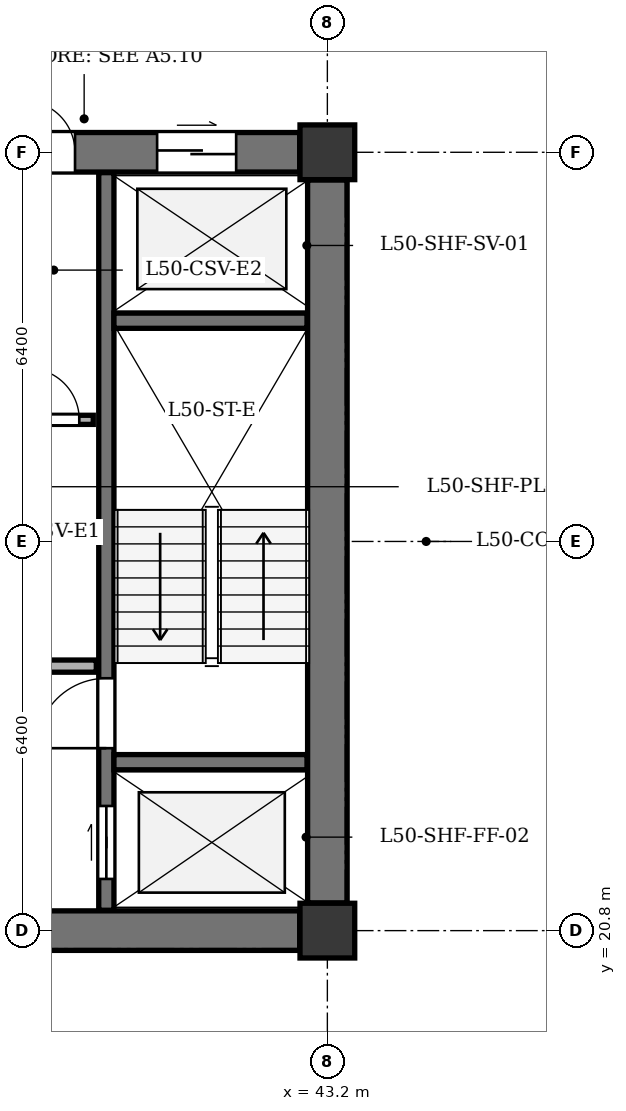
"""IFC4 building model, lengths in metres.
Left out: names, types, materials, properties, quantities, classifications, styles, units other than length and angle.
Written with IfcOpenShell. Run it as: python <this file> out.ifc"""

import sys

from ifc_helpers import new_model, si_unit, direction, frame, frame_2d, origin, origin_2d, place, context, subcontext, project, spatial, rectangle, extrude, element, fill, save


model = new_model("IFC4")
c1 = context("Model", 3, precision=1e-05, world=origin(), true_north=direction((0.0, 1.0)))
c2 = subcontext(c1, "Body", "Model", "MODEL_VIEW")
j1 = project(units=[si_unit("LENGTHUNIT", "METRE"), si_unit("PLANEANGLEUNIT", "RADIAN")], contexts=[c1])
p1 = place(None, origin())
s1 = spatial("IfcSite", under=j1, at=p1, CompositionType="ELEMENT")
p2 = place(p1, origin())
s2 = spatial("IfcBuilding", under=s1, at=p2, CompositionType="ELEMENT")
p3 = place(p2, frame((0.0, 0.0, 193.8)))
s3 = spatial("IfcBuildingStorey", under=s2, at=p3, CompositionType="ELEMENT", Elevation=193.8)
for number, where, z_axis, x_axis in (
    (1, (43.2, 20.8, 0.0), (0.0, 0.0, 1.0), (1.0, 0.0, 0.0)),
    (2, (43.2, 33.6, 0.0), (0.0, 0.0, 1.0), (1.0, 0.0, 0.0)),
):
    element("IfcColumn", number, at=place(p3, frame(where, z_axis=z_axis, x_axis=x_axis)), inside=s3, PredefinedType="COLUMN", context=c2, shape_type="SweptSolid", body=[
        extrude(rectangle(XDim=0.9, YDim=0.9, at=origin_2d()), origin(), (0.0, 0.0, 1.0), 3.5),
    ])
p4 = place(p3, frame((43.2, 21.255, 0.0), z_axis=(0.0, 0.0, 1.0), x_axis=(0.0, 1.0, 0.0)))
e3 = element("IfcWall", 3, at=p4, inside=s3, PredefinedType="SHEAR", context=c2, shape_type="SweptSolid", body=[
    extrude(rectangle(XDim=11.89, YDim=0.65, at=frame_2d((5.945, 0.0))), origin(), (0.0, 0.0, 1.0), 3.05),
])
p5 = place(p3, frame((35.655, 20.8, 0.0), z_axis=(0.0, 0.0, 1.0), x_axis=(1.0, 0.0, 0.0)))
e4 = element("IfcWall", 4, at=p5, inside=s3, PredefinedType="SHEAR", context=c2, shape_type="SweptSolid", body=[
    extrude(rectangle(XDim=7.09, YDim=0.65, at=frame_2d((3.545, 0.0))), origin(), (0.0, 0.0, 1.0), 3.05),
])
p6 = place(p3, frame((35.655, 33.6, 0.0), z_axis=(0.0, 0.0, 1.0), x_axis=(1.0, 0.0, 0.0)))
e5 = element("IfcWall", 5, at=p6, inside=s3, PredefinedType="SHEAR", context=c2, shape_type="SweptSolid", body=[
    extrude(rectangle(XDim=7.09, YDim=0.65, at=frame_2d((3.545, 0.0))), origin(), (0.0, 0.0, 1.0), 3.05),
])
p7 = place(p6, frame((4.745, 0.0, 0.0)))
e6 = element("IfcOpeningElement", 6, at=p7, cuts=e5, PredefinedType="OPENING", context=c2, shape_type="SweptSolid", body=[
    extrude(rectangle(XDim=1.3, YDim=2.15, at=frame_2d((0.65, 1.075))), frame((0.0, 0.335, 0.0), z_axis=(0.0, -1.0, 0.0), x_axis=(1.0, 0.0, 0.0)), (0.0, 0.0, 1.0), 0.67),
])
p8 = place(p6, frame((2.545, 0.0, 0.0)))
e7 = element("IfcOpeningElement", 7, at=p8, cuts=e5, PredefinedType="OPENING", context=c2, shape_type="SweptSolid", body=[
    extrude(rectangle(XDim=0.85, YDim=2.02, at=frame_2d((0.425, 1.01))), frame((0.0, 0.335, 0.0), z_axis=(0.0, -1.0, 0.0), x_axis=(1.0, 0.0, 0.0)), (0.0, 0.0, 1.0), 0.67),
])
p9 = place(p3, frame((39.565, 21.135, 0.0), z_axis=(0.0, 0.0, 1.0), x_axis=(0.0, 1.0, 0.0)))
e8 = element("IfcWall", 8, at=p9, inside=s3, PredefinedType="SHEAR", context=c2, shape_type="SweptSolid", body=[
    extrude(rectangle(XDim=12.13, YDim=0.25, at=frame_2d((6.065, 0.0))), origin(), (0.0, 0.0, 1.0), 3.05),
])
p10 = place(p9, frame((0.515, 0.0, 0.0)))
e9 = element("IfcOpeningElement", 9, at=p10, cuts=e8, PredefinedType="OPENING", context=c2, shape_type="SweptSolid", body=[
    extrude(rectangle(XDim=1.2, YDim=2.15, at=frame_2d((0.6, 1.075))), frame((0.0, 0.135, 0.0), z_axis=(0.0, -1.0, 0.0), x_axis=(1.0, 0.0, 0.0)), (0.0, 0.0, 1.0), 0.27),
])
p11 = place(p9, frame((2.665, 0.0, 0.0)))
e10 = element("IfcOpeningElement", 10, at=p11, cuts=e8, PredefinedType="OPENING", context=c2, shape_type="SweptSolid", body=[
    extrude(rectangle(XDim=1.15, YDim=2.15, at=frame_2d((0.575, 1.075))), frame((0.0, 0.135, 0.0), z_axis=(0.0, -1.0, 0.0), x_axis=(1.0, 0.0, 0.0)), (0.0, 0.0, 1.0), 0.27),
])
for number, where, z_axis, x_axis in (
    (11, (39.69, 23.57, 0.0), (0.0, 0.0, 1.0), (1.0, 0.0, 0.0)),
    (12, (39.69, 30.83, 0.0), (0.0, 0.0, 1.0), (1.0, 0.0, 0.0)),
):
    element("IfcWall", number, at=place(p3, frame(where, z_axis=z_axis, x_axis=x_axis)), inside=s3, PredefinedType="SHEAR", context=c2, shape_type="SweptSolid", body=[
        extrude(rectangle(XDim=3.175, YDim=0.25, at=frame_2d((1.587, 0.0))), origin(), (0.0, 0.0, 1.0), 3.05),
    ])
p12 = place(p3, frame((35.535, 25.15, 0.0), z_axis=(0.0, 0.0, 1.0), x_axis=(1.0, 0.0, 0.0)))
e13 = element("IfcWall", 13, at=p12, inside=s3, PredefinedType="SOLIDWALL", context=c2, shape_type="SweptSolid", body=[
    extrude(rectangle(XDim=3.865, YDim=0.2, at=frame_2d((1.933, 0.0))), origin(), (0.0, 0.0, 1.0), 3.05),
])
p13 = place(p3, frame((38.05, 29.2, 0.0), z_axis=(0.0, 0.0, 1.0), x_axis=(1.0, 0.0, 0.0)))
e14 = element("IfcWall", 14, at=p13, inside=s3, PredefinedType="PARTITIONING", context=c2, shape_type="SweptSolid", body=[
    extrude(rectangle(XDim=1.3, YDim=0.15, at=frame_2d((0.65, 0.0))), origin(), (0.0, 0.0, 1.0), 3.05),
])
p14 = place(p13, frame((0.22, 0.0, 0.0)))
e15 = element("IfcOpeningElement", 15, at=p14, cuts=e14, PredefinedType="OPENING", context=c2, shape_type="SweptSolid", body=[
    extrude(rectangle(XDim=0.85, YDim=2.02, at=frame_2d((0.425, 1.01))), frame((0.0, 0.085, 0.0), z_axis=(0.0, -1.0, 0.0), x_axis=(1.0, 0.0, 0.0)), (0.0, 0.0, 1.0), 0.17),
])
p15 = place(p7, origin())
e16 = element("IfcDoor", 16, at=p15, inside=s3, OperationType="DOUBLE_DOOR_SLIDING", PredefinedType="DOOR", context=c2, shape_type="SweptSolid", body=[
    extrude(rectangle(XDim=1.3, YDim=2.15, at=frame_2d((0.65, 1.075))), frame((0.0, 0.025, 0.0), z_axis=(0.0, -1.0, 0.0), x_axis=(1.0, 0.0, 0.0)), (0.0, 0.0, 1.0), 0.05),
])
fill(e6, e16)
p16 = place(p8, origin())
e17 = element("IfcDoor", 17, at=p16, inside=s3, OperationType="SINGLE_SWING_LEFT", PredefinedType="DOOR", context=c2, shape_type="SweptSolid", body=[
    extrude(rectangle(XDim=0.85, YDim=2.02, at=frame_2d((0.425, 1.01))), frame((0.0, 0.025, 0.0), z_axis=(0.0, -1.0, 0.0), x_axis=(1.0, 0.0, 0.0)), (0.0, 0.0, 1.0), 0.05),
])
fill(e7, e17)
p17 = place(p10, origin())
e18 = element("IfcDoor", 18, at=p17, inside=s3, OperationType="DOUBLE_DOOR_SLIDING", PredefinedType="DOOR", context=c2, shape_type="SweptSolid", body=[
    extrude(rectangle(XDim=1.2, YDim=2.15, at=frame_2d((0.6, 1.075))), frame((0.0, 0.025, 0.0), z_axis=(0.0, -1.0, 0.0), x_axis=(1.0, 0.0, 0.0)), (0.0, 0.0, 1.0), 0.05),
])
fill(e9, e18)
p18 = place(p11, origin())
e19 = element("IfcDoor", 19, at=p18, inside=s3, OperationType="SINGLE_SWING_LEFT", PredefinedType="DOOR", context=c2, shape_type="SweptSolid", body=[
    extrude(rectangle(XDim=1.15, YDim=2.15, at=frame_2d((0.575, 1.075))), frame((0.0, 0.025, 0.0), z_axis=(0.0, -1.0, 0.0), x_axis=(1.0, 0.0, 0.0)), (0.0, 0.0, 1.0), 0.05),
])
fill(e10, e19)
p19 = place(p14, origin())
e20 = element("IfcDoor", 20, at=p19, inside=s3, OperationType="SINGLE_SWING_LEFT", PredefinedType="DOOR", context=c2, shape_type="SweptSolid", body=[
    extrude(rectangle(XDim=0.85, YDim=2.02, at=frame_2d((0.425, 1.01))), frame((0.0, 0.025, 0.0), z_axis=(0.0, -1.0, 0.0), x_axis=(1.0, 0.0, 0.0)), (0.0, 0.0, 1.0), 0.05),
])
fill(e15, e20)
save(model, sys.argv[1])
